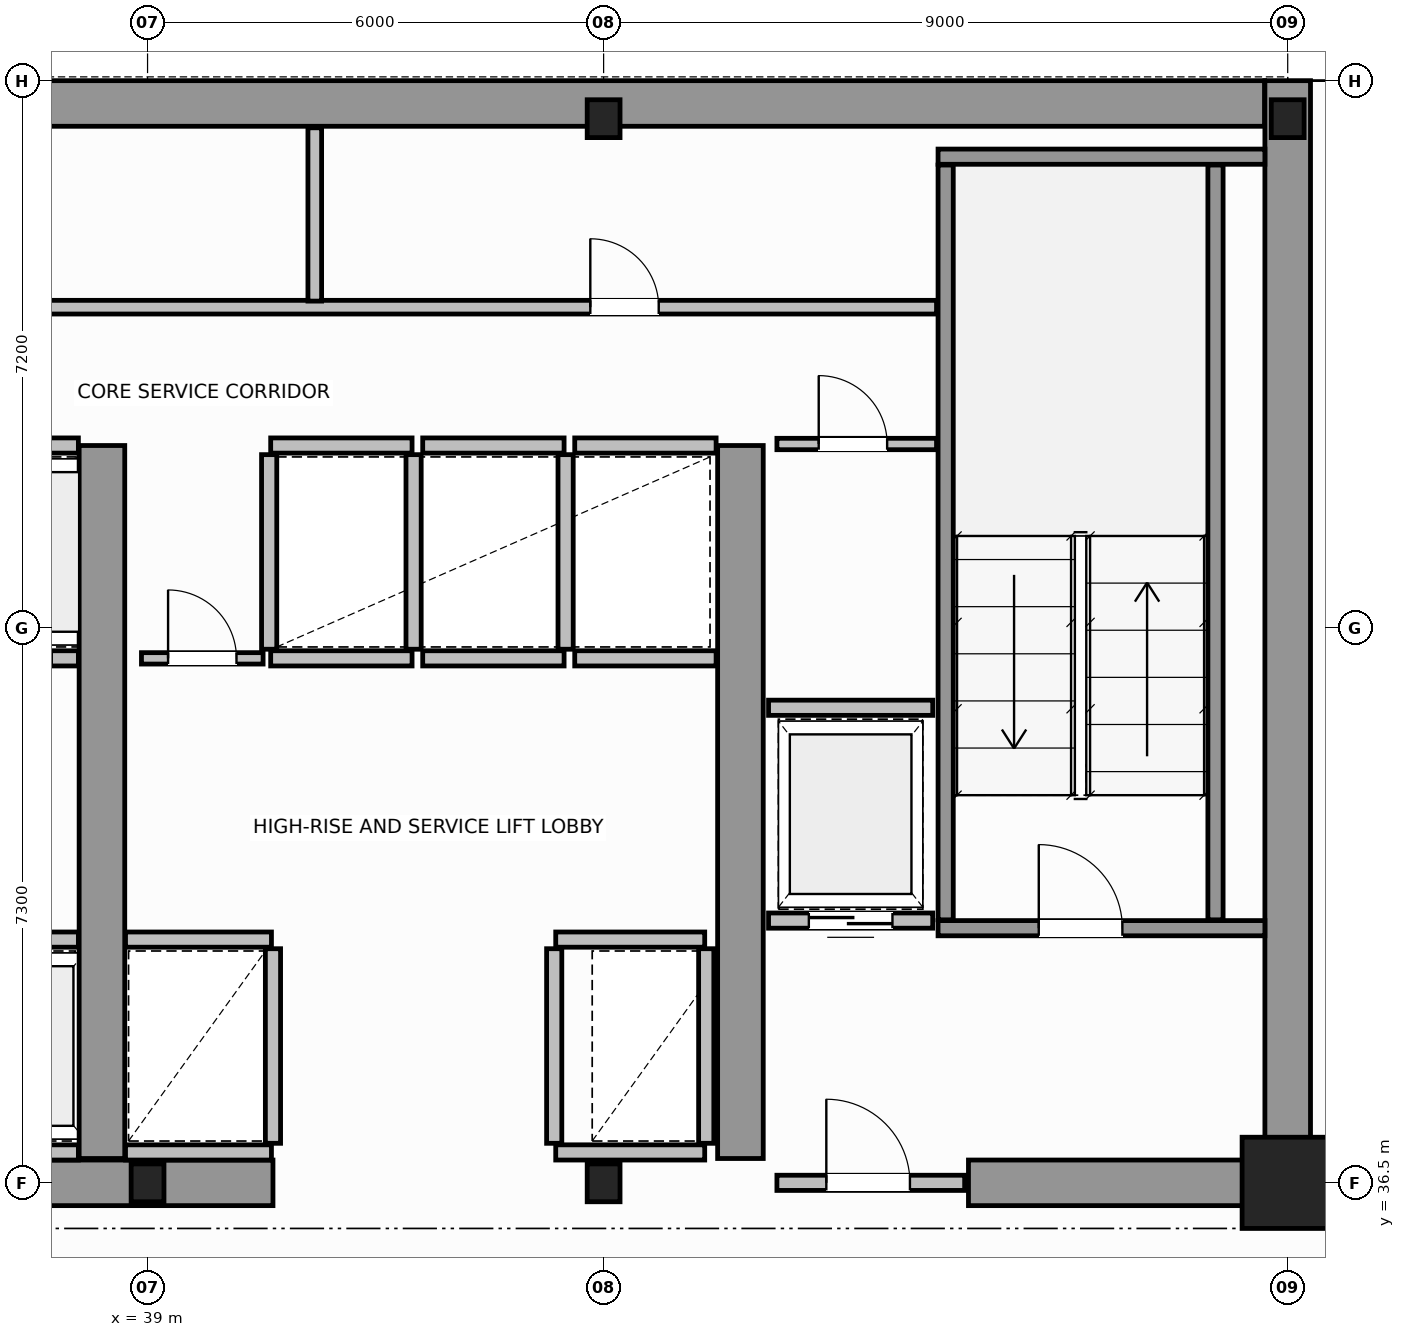
"""IFC4 building model, lengths in metres.
Left out: names, types, materials, properties, quantities, classifications, styles, units other than length and angle.
Written with IfcOpenShell. Run it as: python <this file> out.ifc"""

import sys

from ifc_helpers import new_model, si_unit, direction, frame, frame_2d, origin, origin_2d, place, context, subcontext, project, spatial, rectangle, i_section, extrude, source, transform, mapped, element, fill, save


model = new_model("IFC4")
c1 = context("Model", 3, precision=1e-05, world=origin(), true_north=direction((0.0, 1.0)))
c2 = subcontext(c1, "Body", "Model", "MODEL_VIEW")
j1 = project(units=[si_unit("LENGTHUNIT", "METRE"), si_unit("PLANEANGLEUNIT", "RADIAN")], contexts=[c1])
p1 = place(None, origin())
s1 = spatial("IfcSite", under=j1, at=p1, CompositionType="ELEMENT")
p2 = place(p1, origin())
s2 = spatial("IfcBuilding", under=s1, at=p2, CompositionType="ELEMENT")
p3 = place(p2, frame((0.0, 0.0, 176.6)))
s3 = spatial("IfcBuildingStorey", under=s2, at=p3, CompositionType="ELEMENT", Elevation=176.6)
m1 = source(origin(), c2, "Body", "SweptSolid", [
    extrude(i_section(OverallWidth=0.432, OverallDepth=0.498, WebThickness=0.055, FlangeThickness=0.068, FilletRadius=0.015, at=origin_2d()), origin(), (0.0, 0.0, 1.0), 3.8),
])
for number, where, z_axis, x_axis in (
    (1, (39.0, 36.5, 0.0), (0.0, 0.0, 1.0), (1.0, 0.0, 0.0)),
    (2, (45.0, 36.5, 0.0), (0.0, 0.0, 1.0), (1.0, 0.0, 0.0)),
):
    element("IfcColumn", number, at=place(p3, frame(where, z_axis=z_axis, x_axis=x_axis)), inside=s3, PredefinedType="COLUMN", context=c2, shape_type="MappedRepresentation", body=[
        mapped(m1, transform((0.0, 0.0, 0.0), scale=1.0)),
    ])
m2 = source(origin(), c2, "Body", "SweptSolid", [
    extrude(rectangle(XDim=1.2, YDim=1.2, at=origin_2d()), origin(), (0.0, 0.0, 1.0), 3.8),
])
p4 = place(p3, frame((54.0, 36.5, 0.0), z_axis=(0.0, 0.0, 1.0), x_axis=(1.0, 0.0, 0.0)))
e3 = element("IfcColumn", 3, at=p4, inside=s3, PredefinedType="COLUMN", context=c2, shape_type="MappedRepresentation", body=[
    mapped(m2, transform((0.0, 0.0, 0.0), scale=1.0)),
])
for number, where, z_axis, x_axis in (
    (4, (45.0, 50.5, 0.0), (0.0, 0.0, 1.0), (1.0, 0.0, 0.0)),
    (5, (54.0, 50.5, 0.0), (0.0, 0.0, 1.0), (1.0, 0.0, 0.0)),
):
    element("IfcColumn", number, at=place(p3, frame(where, z_axis=z_axis, x_axis=x_axis)), inside=s3, PredefinedType="COLUMN", context=c2, shape_type="MappedRepresentation", body=[
        mapped(m1, transform((0.0, 0.0, 0.0), scale=1.0)),
    ])
p5 = place(p3, frame((34.002, 50.7, 0.0), z_axis=(0.0, 0.0, 1.0), x_axis=(1.0, 0.0, 0.0)))
e6 = element("IfcWall", 6, at=p5, inside=s3, PredefinedType="SHEAR", context=c2, shape_type="SweptSolid", body=[
    extrude(rectangle(XDim=19.694, YDim=0.6, at=frame_2d((9.847, 0.0))), origin(), (0.0, 0.0, 1.0), 3.8),
])
p6 = place(p3, frame((54.0, 36.5, 0.0), z_axis=(0.0, 0.0, 1.0), x_axis=(0.0, 1.0, 0.0)))
e7 = element("IfcWall", 7, at=p6, inside=s3, PredefinedType="SHEAR", context=c2, shape_type="SweptSolid", body=[
    extrude(rectangle(XDim=14.5, YDim=0.6, at=frame_2d((7.25, 0.0))), origin(), (0.0, 0.0, 1.0), 3.8),
])
p7 = place(p3, frame((36.15, 36.5, 0.0), z_axis=(0.0, 0.0, 1.0), x_axis=(1.0, 0.0, 0.0)))
e8 = element("IfcWall", 8, at=p7, inside=s3, PredefinedType="SHEAR", context=c2, shape_type="SweptSolid", body=[
    extrude(rectangle(XDim=4.5, YDim=0.6, at=frame_2d((2.25, 0.0))), origin(), (0.0, 0.0, 1.0), 3.8),
])
p8 = place(p3, frame((49.8, 36.5, 0.0), z_axis=(0.0, 0.0, 1.0), x_axis=(1.0, 0.0, 0.0)))
e9 = element("IfcWall", 9, at=p8, inside=s3, PredefinedType="SHEAR", context=c2, shape_type="SweptSolid", body=[
    extrude(rectangle(XDim=3.88, YDim=0.6, at=frame_2d((1.94, 0.0))), origin(), (0.0, 0.0, 1.0), 2.58),
])
for number, where, z_axis, x_axis in (
    (10, (38.4, 36.82, 0.0), (0.0, 0.0, 1.0), (0.0, 1.0, 0.0)),
    (11, (46.8, 36.82, 0.0), (0.0, 0.0, 1.0), (0.0, 1.0, 0.0)),
):
    element("IfcWall", number, at=place(p3, frame(where, z_axis=z_axis, x_axis=x_axis)), inside=s3, PredefinedType="SHEAR", context=c2, shape_type="SweptSolid", body=[
        extrude(rectangle(XDim=9.38, YDim=0.6, at=frame_2d((4.69, 0.0))), origin(), (0.0, 0.0, 1.0), 3.8),
    ])
p9 = place(p3, frame((49.4, 39.85, 0.0), z_axis=(0.0, 0.0, 1.0), x_axis=(1.0, 0.0, 0.0)))
e12 = element("IfcWall", 12, at=p9, inside=s3, PredefinedType="SOLIDWALL", context=c2, shape_type="SweptSolid", body=[
    extrude(rectangle(XDim=4.3, YDim=0.2, at=frame_2d((2.15, 0.0))), origin(), (0.0, 0.0, 1.0), 3.8),
])
p10 = place(p9, frame((1.325, 0.0, 0.0)))
e13 = element("IfcOpeningElement", 13, at=p10, cuts=e12, PredefinedType="OPENING", context=c2, shape_type="SweptSolid", body=[
    extrude(rectangle(XDim=1.1, YDim=2.15, at=frame_2d((0.55, 1.075))), frame((0.0, 0.11, 0.0), z_axis=(0.0, -1.0, 0.0), x_axis=(1.0, 0.0, 0.0)), (0.0, 0.0, 1.0), 0.22),
])
p11 = place(p3, frame((49.4, 50.0, 0.0), z_axis=(0.0, 0.0, 1.0), x_axis=(1.0, 0.0, 0.0)))
e14 = element("IfcWall", 14, at=p11, inside=s3, PredefinedType="SOLIDWALL", context=c2, shape_type="SweptSolid", body=[
    extrude(rectangle(XDim=4.3, YDim=0.2, at=frame_2d((2.15, 0.0))), origin(), (0.0, 0.0, 1.0), 3.8),
])
for number, where, z_axis, x_axis in (
    (15, (49.5, 39.96, 0.0), (0.0, 0.0, 1.0), (0.0, 1.0, 0.0)),
    (16, (53.05, 39.96, 0.0), (0.0, 0.0, 1.0), (0.0, 1.0, 0.0)),
):
    element("IfcWall", number, at=place(p3, frame(where, z_axis=z_axis, x_axis=x_axis)), inside=s3, PredefinedType="SOLIDWALL", context=c2, shape_type="SweptSolid", body=[
        extrude(rectangle(XDim=9.93, YDim=0.2, at=frame_2d((4.965, 0.0))), origin(), (0.0, 0.0, 1.0), 3.8),
    ])
p12 = place(p3, frame((47.28, 36.5, 0.0), z_axis=(0.0, 0.0, 1.0), x_axis=(1.0, 0.0, 0.0)))
e17 = element("IfcWall", 17, at=p12, inside=s3, PredefinedType="SOLIDWALL", context=c2, shape_type="SweptSolid", body=[
    extrude(rectangle(XDim=2.47, YDim=0.2, at=frame_2d((1.235, 0.0))), origin(), (0.0, 0.0, 1.0), 2.57),
])
p13 = place(p12, frame((0.65, 0.0, 0.0)))
e18 = element("IfcOpeningElement", 18, at=p13, cuts=e17, PredefinedType="OPENING", context=c2, shape_type="SweptSolid", body=[
    extrude(rectangle(XDim=1.1, YDim=2.15, at=frame_2d((0.55, 1.075))), frame((0.0, 0.11, 0.0), z_axis=(0.0, -1.0, 0.0), x_axis=(1.0, 0.0, 0.0)), (0.0, 0.0, 1.0), 0.22),
])
p14 = place(p3, frame((36.17, 39.7, 0.0), z_axis=(0.0, 0.0, 1.0), x_axis=(1.0, 0.0, 0.0)))
e19 = element("IfcWall", 19, at=p14, inside=s3, PredefinedType="SOLIDWALL", context=c2, shape_type="SweptSolid", body=[
    extrude(rectangle(XDim=1.92, YDim=0.2, at=frame_2d((0.96, 0.0))), origin(), (0.0, 0.0, 1.0), 3.58),
])
p15 = place(p14, frame((0.41, 0.0, 0.0)))
e20 = element("IfcOpeningElement", 20, at=p15, cuts=e19, PredefinedType="OPENING", context=c2, shape_type="SweptSolid", body=[
    extrude(rectangle(XDim=1.1, YDim=2.15, at=frame_2d((0.55, 1.075))), frame((0.0, 0.11, 0.0), z_axis=(0.0, -1.0, 0.0), x_axis=(1.0, 0.0, 0.0)), (0.0, 0.0, 1.0), 0.22),
])
p16 = place(p3, frame((36.17, 36.9, 0.0), z_axis=(0.0, 0.0, 1.0), x_axis=(1.0, 0.0, 0.0)))
e21 = element("IfcWall", 21, at=p16, inside=s3, PredefinedType="SOLIDWALL", context=c2, shape_type="SweptSolid", body=[
    extrude(rectangle(XDim=1.92, YDim=0.2, at=frame_2d((0.96, 0.0))), origin(), (0.0, 0.0, 1.0), 2.37),
])
p17 = place(p3, frame((36.29, 43.4, 0.0), z_axis=(0.0, 0.0, 1.0), x_axis=(1.0, 0.0, 0.0)))
e22 = element("IfcWall", 22, at=p17, inside=s3, PredefinedType="SOLIDWALL", context=c2, shape_type="SweptSolid", body=[
    extrude(rectangle(XDim=1.8, YDim=0.2, at=frame_2d((0.9, 0.0))), origin(), (0.0, 0.0, 1.0), 3.58),
])
p18 = place(p17, frame((0.35, 0.0, 0.0)))
e23 = element("IfcOpeningElement", 23, at=p18, cuts=e22, PredefinedType="OPENING", context=c2, shape_type="SweptSolid", body=[
    extrude(rectangle(XDim=1.1, YDim=2.15, at=frame_2d((0.55, 1.075))), frame((0.0, 0.11, 0.0), z_axis=(0.0, -1.0, 0.0), x_axis=(1.0, 0.0, 0.0)), (0.0, 0.0, 1.0), 0.22),
])
p19 = place(p3, frame((36.29, 46.2, 0.0), z_axis=(0.0, 0.0, 1.0), x_axis=(1.0, 0.0, 0.0)))
e24 = element("IfcWall", 24, at=p19, inside=s3, PredefinedType="SOLIDWALL", context=c2, shape_type="SweptSolid", body=[
    extrude(rectangle(XDim=1.8, YDim=0.2, at=frame_2d((0.9, 0.0))), origin(), (0.0, 0.0, 1.0), 3.58),
])
p20 = place(p3, frame((38.71, 39.7, 0.0), z_axis=(0.0, 0.0, 1.0), x_axis=(1.0, 0.0, 0.0)))
e25 = element("IfcWall", 25, at=p20, inside=s3, PredefinedType="SOLIDWALL", context=c2, shape_type="SweptSolid", body=[
    extrude(rectangle(XDim=1.92, YDim=0.2, at=frame_2d((0.96, 0.0))), origin(), (0.0, 0.0, 1.0), 3.58),
])
p21 = place(p3, frame((38.71, 36.9, 0.0), z_axis=(0.0, 0.0, 1.0), x_axis=(1.0, 0.0, 0.0)))
e26 = element("IfcWall", 26, at=p21, inside=s3, PredefinedType="SOLIDWALL", context=c2, shape_type="SweptSolid", body=[
    extrude(rectangle(XDim=1.92, YDim=0.2, at=frame_2d((0.96, 0.0))), origin(), (0.0, 0.0, 1.0), 2.37),
])
p22 = place(p3, frame((40.65, 37.02, 0.0), z_axis=(0.0, 0.0, 1.0), x_axis=(0.0, 1.0, 0.0)))
e27 = element("IfcWall", 27, at=p22, inside=s3, PredefinedType="SOLIDWALL", context=c2, shape_type="SweptSolid", body=[
    extrude(rectangle(XDim=2.56, YDim=0.2, at=frame_2d((1.28, 0.0))), origin(), (0.0, 0.0, 1.0), 3.58),
])
p23 = place(p3, frame((44.37, 39.7, 0.0), z_axis=(0.0, 0.0, 1.0), x_axis=(1.0, 0.0, 0.0)))
e28 = element("IfcWall", 28, at=p23, inside=s3, PredefinedType="SOLIDWALL", context=c2, shape_type="SweptSolid", body=[
    extrude(rectangle(XDim=1.96, YDim=0.2, at=frame_2d((0.98, 0.0))), origin(), (0.0, 0.0, 1.0), 3.58),
])
p24 = place(p3, frame((44.37, 36.9, 0.0), z_axis=(0.0, 0.0, 1.0), x_axis=(1.0, 0.0, 0.0)))
e29 = element("IfcWall", 29, at=p24, inside=s3, PredefinedType="SOLIDWALL", context=c2, shape_type="SweptSolid", body=[
    extrude(rectangle(XDim=1.96, YDim=0.2, at=frame_2d((0.98, 0.0))), origin(), (0.0, 0.0, 1.0), 2.37),
])
for number, where, z_axis, x_axis in (
    (30, (44.35, 37.02, 0.0), (0.0, 0.0, 1.0), (0.0, 1.0, 0.0)),
    (31, (46.35, 37.02, 0.0), (0.0, 0.0, 1.0), (0.0, 1.0, 0.0)),
):
    element("IfcWall", number, at=place(p3, frame(where, z_axis=z_axis, x_axis=x_axis)), inside=s3, PredefinedType="SOLIDWALL", context=c2, shape_type="SweptSolid", body=[
        extrude(rectangle(XDim=2.56, YDim=0.2, at=frame_2d((1.28, 0.0))), origin(), (0.0, 0.0, 1.0), 3.58),
    ])
for number, where, z_axis, x_axis in (
    (32, (40.62, 43.4, 0.0), (0.0, 0.0, 1.0), (1.0, 0.0, 0.0)),
    (33, (40.62, 46.2, 0.0), (0.0, 0.0, 1.0), (1.0, 0.0, 0.0)),
):
    element("IfcWall", number, at=place(p3, frame(where, z_axis=z_axis, x_axis=x_axis)), inside=s3, PredefinedType="SOLIDWALL", context=c2, shape_type="SweptSolid", body=[
        extrude(rectangle(XDim=1.86, YDim=0.2, at=frame_2d((0.93, 0.0))), origin(), (0.0, 0.0, 1.0), 3.58),
    ])
for number, where, z_axis, x_axis in (
    (34, (40.6, 43.52, 0.0), (0.0, 0.0, 1.0), (0.0, 1.0, 0.0)),
    (35, (42.5, 43.52, 0.0), (0.0, 0.0, 1.0), (0.0, 1.0, 0.0)),
):
    element("IfcWall", number, at=place(p3, frame(where, z_axis=z_axis, x_axis=x_axis)), inside=s3, PredefinedType="SOLIDWALL", context=c2, shape_type="SweptSolid", body=[
        extrude(rectangle(XDim=2.56, YDim=0.2, at=frame_2d((1.28, 0.0))), origin(), (0.0, 0.0, 1.0), 3.58),
    ])
for number, where, z_axis, x_axis in (
    (36, (42.62, 43.4, 0.0), (0.0, 0.0, 1.0), (1.0, 0.0, 0.0)),
    (37, (42.62, 46.2, 0.0), (0.0, 0.0, 1.0), (1.0, 0.0, 0.0)),
):
    element("IfcWall", number, at=place(p3, frame(where, z_axis=z_axis, x_axis=x_axis)), inside=s3, PredefinedType="SOLIDWALL", context=c2, shape_type="SweptSolid", body=[
        extrude(rectangle(XDim=1.86, YDim=0.2, at=frame_2d((0.93, 0.0))), origin(), (0.0, 0.0, 1.0), 3.58),
    ])
p25 = place(p3, frame((44.5, 43.52, 0.0), z_axis=(0.0, 0.0, 1.0), x_axis=(0.0, 1.0, 0.0)))
e38 = element("IfcWall", 38, at=p25, inside=s3, PredefinedType="SOLIDWALL", context=c2, shape_type="SweptSolid", body=[
    extrude(rectangle(XDim=2.56, YDim=0.2, at=frame_2d((1.28, 0.0))), origin(), (0.0, 0.0, 1.0), 2.37),
])
for number, where, z_axis, x_axis in (
    (39, (44.62, 43.4, 0.0), (0.0, 0.0, 1.0), (1.0, 0.0, 0.0)),
    (40, (44.62, 46.2, 0.0), (0.0, 0.0, 1.0), (1.0, 0.0, 0.0)),
):
    element("IfcWall", number, at=place(p3, frame(where, z_axis=z_axis, x_axis=x_axis)), inside=s3, PredefinedType="SOLIDWALL", context=c2, shape_type="SweptSolid", body=[
        extrude(rectangle(XDim=1.86, YDim=0.2, at=frame_2d((0.93, 0.0))), origin(), (0.0, 0.0, 1.0), 3.58),
    ])
p26 = place(p3, frame((47.17, 39.95, 0.0), z_axis=(0.0, 0.0, 1.0), x_axis=(1.0, 0.0, 0.0)))
e41 = element("IfcWall", 41, at=p26, inside=s3, PredefinedType="SOLIDWALL", context=c2, shape_type="SweptSolid", body=[
    extrude(rectangle(XDim=2.16, YDim=0.2, at=frame_2d((1.08, 0.0))), origin(), (0.0, 0.0, 1.0), 3.58),
])
p27 = place(p26, frame((0.53, 0.0, 0.0)))
e42 = element("IfcOpeningElement", 42, at=p27, cuts=e41, PredefinedType="OPENING", context=c2, shape_type="SweptSolid", body=[
    extrude(rectangle(XDim=1.1, YDim=2.15, at=frame_2d((0.55, 1.075))), frame((0.0, 0.11, 0.0), z_axis=(0.0, -1.0, 0.0), x_axis=(1.0, 0.0, 0.0)), (0.0, 0.0, 1.0), 0.22),
])
p28 = place(p3, frame((47.17, 42.75, 0.0), z_axis=(0.0, 0.0, 1.0), x_axis=(1.0, 0.0, 0.0)))
e43 = element("IfcWall", 43, at=p28, inside=s3, PredefinedType="SOLIDWALL", context=c2, shape_type="SweptSolid", body=[
    extrude(rectangle(XDim=2.16, YDim=0.2, at=frame_2d((1.08, 0.0))), origin(), (0.0, 0.0, 1.0), 3.58),
])
p29 = place(p3, frame((47.28, 46.22, 0.0), z_axis=(0.0, 0.0, 1.0), x_axis=(1.0, 0.0, 0.0)))
e44 = element("IfcWall", 44, at=p29, inside=s3, PredefinedType="PARTITIONING", context=c2, shape_type="SweptSolid", body=[
    extrude(rectangle(XDim=2.1, YDim=0.15, at=frame_2d((1.05, 0.0))), origin(), (0.0, 0.0, 1.0), 3.58),
])
p30 = place(p29, frame((0.55, 0.0, 0.0)))
e45 = element("IfcOpeningElement", 45, at=p30, cuts=e44, PredefinedType="OPENING", context=c2, shape_type="SweptSolid", body=[
    extrude(rectangle(XDim=0.9, YDim=2.1, at=frame_2d((0.45, 1.05))), frame((0.0, 0.085, 0.0), z_axis=(0.0, -1.0, 0.0), x_axis=(1.0, 0.0, 0.0)), (0.0, 0.0, 1.0), 0.17),
])
p31 = place(p3, frame((38.92, 43.4, 0.0), z_axis=(0.0, 0.0, 1.0), x_axis=(1.0, 0.0, 0.0)))
e46 = element("IfcWall", 46, at=p31, inside=s3, PredefinedType="PARTITIONING", context=c2, shape_type="SweptSolid", body=[
    extrude(rectangle(XDim=1.6, YDim=0.15, at=frame_2d((0.8, 0.0))), origin(), (0.0, 0.0, 1.0), 3.58),
])
p32 = place(p31, frame((0.35, 0.0, 0.0)))
e47 = element("IfcOpeningElement", 47, at=p32, cuts=e46, PredefinedType="OPENING", context=c2, shape_type="SweptSolid", body=[
    extrude(rectangle(XDim=0.9, YDim=2.1, at=frame_2d((0.45, 1.05))), frame((0.0, 0.085, 0.0), z_axis=(0.0, -1.0, 0.0), x_axis=(1.0, 0.0, 0.0)), (0.0, 0.0, 1.0), 0.17),
])
p33 = place(p3, frame((18.62, 48.02, 0.0), z_axis=(0.0, 0.0, 1.0), x_axis=(1.0, 0.0, 0.0)))
e48 = element("IfcWall", 48, at=p33, inside=s3, PredefinedType="PLUMBINGWALL", context=c2, shape_type="SweptSolid", body=[
    extrude(rectangle(XDim=30.76, YDim=0.18, at=frame_2d((15.38, 0.0))), origin(), (0.0, 0.0, 1.0), 3.58),
])
p34 = place(p33, frame((1.955, 0.0, 0.0)))
e49 = element("IfcOpeningElement", 49, at=p34, cuts=e48, PredefinedType="OPENING", context=c2, shape_type="SweptSolid", body=[
    extrude(rectangle(XDim=0.9, YDim=2.15, at=frame_2d((0.45, 1.075))), frame((0.0, 0.1, 0.0), z_axis=(0.0, -1.0, 0.0), x_axis=(1.0, 0.0, 0.0)), (0.0, 0.0, 1.0), 0.2),
])
p35 = place(p33, frame((8.03, 0.0, 0.0)))
e50 = element("IfcOpeningElement", 50, at=p35, cuts=e48, PredefinedType="OPENING", context=c2, shape_type="SweptSolid", body=[
    extrude(rectangle(XDim=0.9, YDim=2.15, at=frame_2d((0.45, 1.075))), frame((0.0, 0.1, 0.0), z_axis=(0.0, -1.0, 0.0), x_axis=(1.0, 0.0, 0.0)), (0.0, 0.0, 1.0), 0.2),
])
p36 = place(p33, frame((16.93, 0.0, 0.0)))
e51 = element("IfcOpeningElement", 51, at=p36, cuts=e48, PredefinedType="OPENING", context=c2, shape_type="SweptSolid", body=[
    extrude(rectangle(XDim=0.9, YDim=2.15, at=frame_2d((0.45, 1.075))), frame((0.0, 0.1, 0.0), z_axis=(0.0, -1.0, 0.0), x_axis=(1.0, 0.0, 0.0)), (0.0, 0.0, 1.0), 0.2),
])
p37 = place(p33, frame((26.205, 0.0, 0.0)))
e52 = element("IfcOpeningElement", 52, at=p37, cuts=e48, PredefinedType="OPENING", context=c2, shape_type="SweptSolid", body=[
    extrude(rectangle(XDim=0.9, YDim=2.15, at=frame_2d((0.45, 1.075))), frame((0.0, 0.1, 0.0), z_axis=(0.0, -1.0, 0.0), x_axis=(1.0, 0.0, 0.0)), (0.0, 0.0, 1.0), 0.2),
])
p38 = place(p3, frame((41.2, 48.1, 0.0), z_axis=(0.0, 0.0, 1.0), x_axis=(0.0, 1.0, 0.0)))
e53 = element("IfcWall", 53, at=p38, inside=s3, PredefinedType="PLUMBINGWALL", context=c2, shape_type="SweptSolid", body=[
    extrude(rectangle(XDim=2.28, YDim=0.18, at=frame_2d((1.14, 0.0))), origin(), (0.0, 0.0, 1.0), 3.58),
])
p39 = place(p3, frame((54.06, 36.48, 0.0), z_axis=(0.0, 0.0, 1.0), x_axis=(1.0, 0.0, 0.0)))
e54 = element("IfcWall", 54, at=p39, inside=s3, PredefinedType="PARTITIONING", context=c2, shape_type="SweptSolid", body=[
    extrude(rectangle(XDim=6.666, YDim=0.12, at=frame_2d((3.333, 0.0))), origin(), (0.0, 0.0, 1.0), 2.37),
])
p40 = place(p39, frame((2.883, 0.0, 0.0)))
e55 = element("IfcOpeningElement", 55, at=p40, cuts=e54, PredefinedType="OPENING", context=c2, shape_type="SweptSolid", body=[
    extrude(rectangle(XDim=0.9, YDim=2.15, at=frame_2d((0.45, 1.075))), frame((0.0, 0.07, 0.0), z_axis=(0.0, -1.0, 0.0), x_axis=(1.0, 0.0, 0.0)), (0.0, 0.0, 1.0), 0.14),
])
m3 = source(origin(), c2, "Body", "SweptSolid", [
    extrude(rectangle(XDim=1.1, YDim=2.15, at=frame_2d((0.55, 1.075))), frame((0.0, 0.025, 0.0), z_axis=(0.0, -1.0, 0.0), x_axis=(1.0, 0.0, 0.0)), (0.0, 0.0, 1.0), 0.05),
])
p41 = place(p10, origin())
e56 = element("IfcDoor", 56, at=p41, inside=s3, OperationType="SINGLE_SWING_RIGHT", PredefinedType="DOOR", context=c2, shape_type="MappedRepresentation", body=[
    mapped(m3, transform((0.0, 0.0, 0.0), scale=1.0)),
])
fill(e13, e56)
p42 = place(p13, origin())
e57 = element("IfcDoor", 57, at=p42, inside=s3, OperationType="SINGLE_SWING_LEFT", PredefinedType="DOOR", context=c2, shape_type="MappedRepresentation", body=[
    mapped(m3, transform((0.0, 0.0, 0.0), scale=1.0)),
])
fill(e18, e57)
p43 = place(p27, origin())
e58 = element("IfcDoor", 58, at=p43, inside=s3, OperationType="DOUBLE_DOOR_SLIDING", PredefinedType="DOOR", context=c2, shape_type="MappedRepresentation", body=[
    mapped(m3, transform((0.0, 0.0, 0.0), scale=1.0)),
])
fill(e42, e58)
m4 = source(origin(), c2, "Body", "SweptSolid", [
    extrude(rectangle(XDim=0.9, YDim=2.1, at=frame_2d((0.45, 1.05))), frame((0.0, 0.025, 0.0), z_axis=(0.0, -1.0, 0.0), x_axis=(1.0, 0.0, 0.0)), (0.0, 0.0, 1.0), 0.05),
])
p44 = place(p30, origin())
e59 = element("IfcDoor", 59, at=p44, inside=s3, OperationType="SINGLE_SWING_RIGHT", PredefinedType="DOOR", context=c2, shape_type="MappedRepresentation", body=[
    mapped(m4, transform((0.0, 0.0, 0.0), scale=1.0)),
])
fill(e45, e59)
p45 = place(p32, origin())
e60 = element("IfcDoor", 60, at=p45, inside=s3, OperationType="SINGLE_SWING_LEFT", PredefinedType="DOOR", context=c2, shape_type="MappedRepresentation", body=[
    mapped(m4, transform((0.0, 0.0, 0.0), scale=1.0)),
])
fill(e47, e60)
m5 = source(origin(), c2, "Body", "SweptSolid", [
    extrude(rectangle(XDim=0.9, YDim=2.15, at=frame_2d((0.45, 1.075))), frame((0.0, 0.025, 0.0), z_axis=(0.0, -1.0, 0.0), x_axis=(1.0, 0.0, 0.0)), (0.0, 0.0, 1.0), 0.05),
])
p46 = place(p37, origin())
e61 = element("IfcDoor", 61, at=p46, inside=s3, OperationType="SINGLE_SWING_RIGHT", PredefinedType="DOOR", context=c2, shape_type="MappedRepresentation", body=[
    mapped(m5, transform((0.0, 0.0, 0.0), scale=1.0)),
])
fill(e52, e61)
save(model, sys.argv[1])
